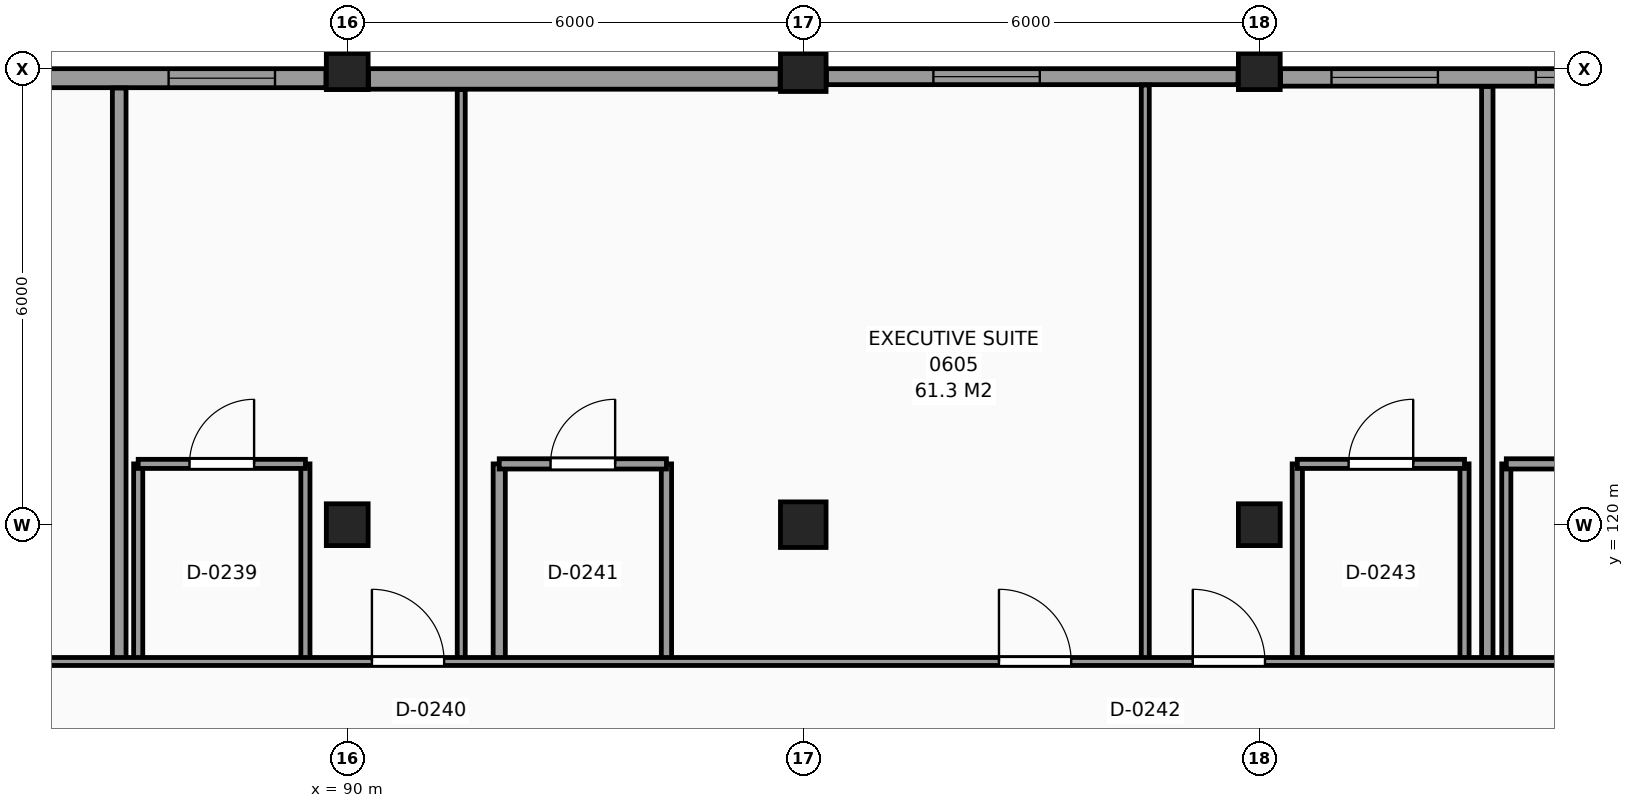
"""IFC4 building model, lengths in metres.
Left out: names, types, materials, properties, quantities, classifications, styles, units other than length and angle.
Written with IfcOpenShell. Run it as: python <this file> out.ifc"""

import sys

from ifc_helpers import new_model, si_unit, direction, frame, frame_2d, origin, origin_2d, place, context, subcontext, project, spatial, rectangle, extrude, element, fill, save


model = new_model("IFC4")
c1 = context("Model", 3, precision=1e-05, world=origin(), true_north=direction((0.0, 1.0)))
c2 = subcontext(c1, "Body", "Model", "MODEL_VIEW")
j1 = project(units=[si_unit("LENGTHUNIT", "METRE"), si_unit("PLANEANGLEUNIT", "RADIAN")], contexts=[c1])
p1 = place(None, origin())
s1 = spatial("IfcSite", under=j1, at=p1, CompositionType="ELEMENT")
p2 = place(p1, origin())
s2 = spatial("IfcBuilding", under=s1, at=p2, CompositionType="ELEMENT")
p3 = place(p2, frame((0.0, 0.0, 28.2)))
s3 = spatial("IfcBuildingStorey", under=s2, at=p3, CompositionType="ELEMENT", Elevation=28.2)
for number, where, z_axis, x_axis in (
    (1, (90.0, 120.0, 0.0), (0.0, 0.0, 1.0), (1.0, 0.0, 0.0)),
    (2, (90.0, 126.0, 0.0), (0.0, 0.0, 1.0), (1.0, 0.0, 0.0)),
):
    element("IfcColumn", number, at=place(p3, frame(where, z_axis=z_axis, x_axis=x_axis)), inside=s3, PredefinedType="COLUMN", context=c2, shape_type="SweptSolid", body=[
        extrude(rectangle(XDim=0.55, YDim=0.55, at=origin_2d()), origin(), (0.0, 0.0, 1.0), 3.3),
    ])
for number, where, z_axis, x_axis in (
    (3, (96.0, 120.0, 0.0), (0.0, 0.0, 1.0), (1.0, 0.0, 0.0)),
    (4, (96.0, 126.0, 0.0), (0.0, 0.0, 1.0), (1.0, 0.0, 0.0)),
):
    element("IfcColumn", number, at=place(p3, frame(where, z_axis=z_axis, x_axis=x_axis)), inside=s3, PredefinedType="COLUMN", context=c2, shape_type="SweptSolid", body=[
        extrude(rectangle(XDim=0.6, YDim=0.6, at=origin_2d()), origin(), (0.0, 0.0, 1.0), 3.3),
    ])
for number, where, z_axis, x_axis in (
    (5, (102.0, 120.0, 0.0), (0.0, 0.0, 1.0), (1.0, 0.0, 0.0)),
    (6, (102.0, 126.0, 0.0), (0.0, 0.0, 1.0), (1.0, 0.0, 0.0)),
):
    element("IfcColumn", number, at=place(p3, frame(where, z_axis=z_axis, x_axis=x_axis)), inside=s3, PredefinedType="COLUMN", context=c2, shape_type="SweptSolid", body=[
        extrude(rectangle(XDim=0.55, YDim=0.55, at=origin_2d()), origin(), (0.0, 0.0, 1.0), 3.3),
    ])
p4 = place(p3, frame((107.695, 125.885, 0.0), z_axis=(0.0, 0.0, 1.0), x_axis=(-1.0, 0.0, 0.0)))
e7 = element("IfcWall", 7, at=p4, inside=s3, PredefinedType="SOLIDWALL", context=c2, shape_type="SweptSolid", body=[
    extrude(rectangle(XDim=5.415, YDim=0.23, at=frame_2d((2.708, 0.0))), origin(), (0.0, 0.0, 1.0), 2.43),
])
p5 = place(p4, frame((3.345, 0.0, 0.8)))
e8 = element("IfcOpeningElement", 8, at=p5, cuts=e7, PredefinedType="OPENING", context=c2, shape_type="SweptSolid", body=[
    extrude(rectangle(XDim=1.4, YDim=1.4, at=frame_2d((0.7, 0.7))), frame((0.0, 0.125, 0.0), z_axis=(0.0, -1.0, 0.0), x_axis=(1.0, 0.0, 0.0)), (0.0, 0.0, 1.0), 0.25),
])
p6 = place(p4, frame((0.657, 0.0, 0.8)))
e9 = element("IfcOpeningElement", 9, at=p6, cuts=e7, PredefinedType="OPENING", context=c2, shape_type="SweptSolid", body=[
    extrude(rectangle(XDim=1.4, YDim=1.4, at=frame_2d((0.7, 0.7))), frame((0.0, 0.125, 0.0), z_axis=(0.0, -1.0, 0.0), x_axis=(1.0, 0.0, 0.0)), (0.0, 0.0, 1.0), 0.25),
])
p7 = place(p3, frame((101.72, 125.895, 0.0), z_axis=(0.0, 0.0, 1.0), x_axis=(-1.0, 0.0, 0.0)))
e10 = element("IfcWall", 10, at=p7, inside=s3, PredefinedType="SOLIDWALL", context=c2, shape_type="SweptSolid", body=[
    extrude(rectangle(XDim=5.415, YDim=0.21, at=frame_2d((2.708, 0.0))), origin(), (0.0, 0.0, 1.0), 2.43),
])
p8 = place(p7, frame((2.608, 0.0, 0.8)))
e11 = element("IfcOpeningElement", 11, at=p8, cuts=e10, PredefinedType="OPENING", context=c2, shape_type="SweptSolid", body=[
    extrude(rectangle(XDim=1.4, YDim=1.4, at=frame_2d((0.7, 0.7))), frame((0.0, 0.115, 0.0), z_axis=(0.0, -1.0, 0.0), x_axis=(1.0, 0.0, 0.0)), (0.0, 0.0, 1.0), 0.23),
])
p9 = place(p3, frame((95.695, 125.865, 0.0), z_axis=(0.0, 0.0, 1.0), x_axis=(-1.0, 0.0, 0.0)))
e12 = element("IfcWall", 12, at=p9, inside=s3, PredefinedType="SOLIDWALL", context=c2, shape_type="SweptSolid", body=[
    extrude(rectangle(XDim=5.415, YDim=0.27, at=frame_2d((2.708, 0.0))), origin(), (0.0, 0.0, 1.0), 2.43),
])
p10 = place(p3, frame((89.72, 125.875, 0.0), z_axis=(0.0, 0.0, 1.0), x_axis=(-1.0, 0.0, 0.0)))
e13 = element("IfcWall", 13, at=p10, inside=s3, PredefinedType="SOLIDWALL", context=c2, shape_type="SweptSolid", body=[
    extrude(rectangle(XDim=5.415, YDim=0.25, at=frame_2d((2.708, 0.0))), origin(), (0.0, 0.0, 1.0), 2.43),
])
p11 = place(p10, frame((0.67, 0.0, 0.8)))
e14 = element("IfcOpeningElement", 14, at=p11, cuts=e13, PredefinedType="OPENING", context=c2, shape_type="SweptSolid", body=[
    extrude(rectangle(XDim=1.4, YDim=1.4, at=frame_2d((0.7, 0.7))), frame((0.0, 0.135, 0.0), z_axis=(0.0, -1.0, 0.0), x_axis=(1.0, 0.0, 0.0)), (0.0, 0.0, 1.0), 0.27),
])
p12 = place(p3, frame((87.0, 118.2, 0.0), z_axis=(0.0, 0.0, 1.0), x_axis=(0.0, 1.0, 0.0)))
e15 = element("IfcWall", 15, at=p12, inside=s3, PredefinedType="PARTITIONING", context=c2, shape_type="SweptSolid", body=[
    extrude(rectangle(XDim=7.545, YDim=0.18, at=frame_2d((3.772, 0.0))), origin(), (0.0, 0.0, 1.0), 3.08),
])
for number, where, z_axis, x_axis in (
    (16, (87.25, 118.2, 0.0), (0.0, 0.0, 1.0), (0.0, 1.0, 0.0)),
    (17, (89.45, 118.2, 0.0), (0.0, 0.0, 1.0), (0.0, 1.0, 0.0)),
):
    element("IfcWall", number, at=place(p3, frame(where, z_axis=z_axis, x_axis=x_axis)), inside=s3, PredefinedType="PARTITIONING", context=c2, shape_type="SweptSolid", body=[
        extrude(rectangle(XDim=2.6, YDim=0.12, at=frame_2d((1.3, 0.0))), origin(), (0.0, 0.0, 1.0), 3.08),
    ])
p13 = place(p3, frame((91.5, 118.2, 0.0), z_axis=(0.0, 0.0, 1.0), x_axis=(0.0, 1.0, 0.0)))
e18 = element("IfcWall", 18, at=p13, inside=s3, PredefinedType="PARTITIONING", context=c2, shape_type="SweptSolid", body=[
    extrude(rectangle(XDim=7.525, YDim=0.105, at=frame_2d((3.763, 0.0))), origin(), (0.0, 0.0, 1.0), 3.08),
])
p14 = place(p3, frame((92.0, 118.2, 0.0), z_axis=(0.0, 0.0, 1.0), x_axis=(0.0, 1.0, 0.0)))
e19 = element("IfcWall", 19, at=p14, inside=s3, PredefinedType="PARTITIONING", context=c2, shape_type="SweptSolid", body=[
    extrude(rectangle(XDim=2.6, YDim=0.16, at=frame_2d((1.3, 0.0))), origin(), (0.0, 0.0, 1.0), 3.08),
])
p15 = place(p3, frame((94.2, 118.2, 0.0), z_axis=(0.0, 0.0, 1.0), x_axis=(0.0, 1.0, 0.0)))
e20 = element("IfcWall", 20, at=p15, inside=s3, PredefinedType="PARTITIONING", context=c2, shape_type="SweptSolid", body=[
    extrude(rectangle(XDim=2.6, YDim=0.135, at=frame_2d((1.3, 0.0))), origin(), (0.0, 0.0, 1.0), 3.08),
])
p16 = place(p3, frame((100.5, 118.2, 0.0), z_axis=(0.0, 0.0, 1.0), x_axis=(0.0, 1.0, 0.0)))
e21 = element("IfcWall", 21, at=p16, inside=s3, PredefinedType="PARTITIONING", context=c2, shape_type="SweptSolid", body=[
    extrude(rectangle(XDim=7.585, YDim=0.105, at=frame_2d((3.792, 0.0))), origin(), (0.0, 0.0, 1.0), 3.08),
])
p17 = place(p3, frame((102.5, 118.2, 0.0), z_axis=(0.0, 0.0, 1.0), x_axis=(0.0, 1.0, 0.0)))
e22 = element("IfcWall", 22, at=p17, inside=s3, PredefinedType="PARTITIONING", context=c2, shape_type="SweptSolid", body=[
    extrude(rectangle(XDim=2.6, YDim=0.135, at=frame_2d((1.3, 0.0))), origin(), (0.0, 0.0, 1.0), 3.08),
])
p18 = place(p3, frame((104.7, 118.2, 0.0), z_axis=(0.0, 0.0, 1.0), x_axis=(0.0, 1.0, 0.0)))
e23 = element("IfcWall", 23, at=p18, inside=s3, PredefinedType="PARTITIONING", context=c2, shape_type="SweptSolid", body=[
    extrude(rectangle(XDim=2.6, YDim=0.12, at=frame_2d((1.3, 0.0))), origin(), (0.0, 0.0, 1.0), 3.08),
])
p19 = place(p3, frame((105.0, 118.2, 0.0), z_axis=(0.0, 0.0, 1.0), x_axis=(0.0, 1.0, 0.0)))
e24 = element("IfcWall", 24, at=p19, inside=s3, PredefinedType="PARTITIONING", context=c2, shape_type="SweptSolid", body=[
    extrude(rectangle(XDim=7.565, YDim=0.15, at=frame_2d((3.782, 0.0))), origin(), (0.0, 0.0, 1.0), 3.08),
])
p20 = place(p3, frame((105.25, 118.2, 0.0), z_axis=(0.0, 0.0, 1.0), x_axis=(0.0, 1.0, 0.0)))
e25 = element("IfcWall", 25, at=p20, inside=s3, PredefinedType="PARTITIONING", context=c2, shape_type="SweptSolid", body=[
    extrude(rectangle(XDim=2.6, YDim=0.12, at=frame_2d((1.3, 0.0))), origin(), (0.0, 0.0, 1.0), 3.08),
])
p21 = place(p3, frame((66.235, 118.2, 0.0), z_axis=(0.0, 0.0, 1.0), x_axis=(1.0, 0.0, 0.0)))
e26 = element("IfcWall", 26, at=p21, inside=s3, PredefinedType="PARTITIONING", context=c2, shape_type="SweptSolid", body=[
    extrude(rectangle(XDim=110.265, YDim=0.105, at=frame_2d((55.132, 0.0))), origin(), (0.0, 0.0, 1.0), 3.08),
])
p22 = place(p21, frame((0.49, 0.0, 0.0)))
e27 = element("IfcOpeningElement", 27, at=p22, cuts=e26, PredefinedType="OPENING", context=c2, shape_type="SweptSolid", body=[
    extrude(rectangle(XDim=0.95, YDim=2.1, at=frame_2d((0.475, 1.05))), frame((0.0, 0.062, 0.0), z_axis=(0.0, -1.0, 0.0), x_axis=(1.0, 0.0, 0.0)), (0.0, 0.0, 1.0), 0.125),
])
p23 = place(p21, frame((4.89, 0.0, 0.0)))
e28 = element("IfcOpeningElement", 28, at=p23, cuts=e26, PredefinedType="OPENING", context=c2, shape_type="SweptSolid", body=[
    extrude(rectangle(XDim=0.95, YDim=2.1, at=frame_2d((0.475, 1.05))), frame((0.0, 0.062, 0.0), z_axis=(0.0, -1.0, 0.0), x_axis=(1.0, 0.0, 0.0)), (0.0, 0.0, 1.0), 0.125),
])
p24 = place(p21, frame((9.39, 0.0, 0.0)))
e29 = element("IfcOpeningElement", 29, at=p24, cuts=e26, PredefinedType="OPENING", context=c2, shape_type="SweptSolid", body=[
    extrude(rectangle(XDim=0.95, YDim=2.1, at=frame_2d((0.475, 1.05))), frame((0.0, 0.062, 0.0), z_axis=(0.0, -1.0, 0.0), x_axis=(1.0, 0.0, 0.0)), (0.0, 0.0, 1.0), 0.125),
])
p25 = place(p21, frame((24.09, 0.0, 0.0)))
e30 = element("IfcOpeningElement", 30, at=p25, cuts=e26, PredefinedType="OPENING", context=c2, shape_type="SweptSolid", body=[
    extrude(rectangle(XDim=0.95, YDim=2.1, at=frame_2d((0.475, 1.05))), frame((0.0, 0.062, 0.0), z_axis=(0.0, -1.0, 0.0), x_axis=(1.0, 0.0, 0.0)), (0.0, 0.0, 1.0), 0.125),
])
p26 = place(p21, frame((32.34, 0.0, 0.0)))
e31 = element("IfcOpeningElement", 31, at=p26, cuts=e26, PredefinedType="OPENING", context=c2, shape_type="SweptSolid", body=[
    extrude(rectangle(XDim=0.95, YDim=2.1, at=frame_2d((0.475, 1.05))), frame((0.0, 0.062, 0.0), z_axis=(0.0, -1.0, 0.0), x_axis=(1.0, 0.0, 0.0)), (0.0, 0.0, 1.0), 0.125),
])
p27 = place(p21, frame((34.89, 0.0, 0.0)))
e32 = element("IfcOpeningElement", 32, at=p27, cuts=e26, PredefinedType="OPENING", context=c2, shape_type="SweptSolid", body=[
    extrude(rectangle(XDim=0.95, YDim=2.1, at=frame_2d((0.475, 1.05))), frame((0.0, 0.062, 0.0), z_axis=(0.0, -1.0, 0.0), x_axis=(1.0, 0.0, 0.0)), (0.0, 0.0, 1.0), 0.125),
])
p28 = place(p21, frame((42.09, 0.0, 0.0)))
e33 = element("IfcOpeningElement", 33, at=p28, cuts=e26, PredefinedType="OPENING", context=c2, shape_type="SweptSolid", body=[
    extrude(rectangle(XDim=0.95, YDim=2.1, at=frame_2d((0.475, 1.05))), frame((0.0, 0.062, 0.0), z_axis=(0.0, -1.0, 0.0), x_axis=(1.0, 0.0, 0.0)), (0.0, 0.0, 1.0), 0.125),
])
p29 = place(p21, frame((46.29, 0.0, 0.0)))
e34 = element("IfcOpeningElement", 34, at=p29, cuts=e26, PredefinedType="OPENING", context=c2, shape_type="SweptSolid", body=[
    extrude(rectangle(XDim=0.95, YDim=2.1, at=frame_2d((0.475, 1.05))), frame((0.0, 0.062, 0.0), z_axis=(0.0, -1.0, 0.0), x_axis=(1.0, 0.0, 0.0)), (0.0, 0.0, 1.0), 0.125),
])
p30 = place(p21, frame((48.49, 0.0, 0.0)))
e35 = element("IfcOpeningElement", 35, at=p30, cuts=e26, PredefinedType="OPENING", context=c2, shape_type="SweptSolid", body=[
    extrude(rectangle(XDim=0.95, YDim=2.1, at=frame_2d((0.475, 1.05))), frame((0.0, 0.062, 0.0), z_axis=(0.0, -1.0, 0.0), x_axis=(1.0, 0.0, 0.0)), (0.0, 0.0, 1.0), 0.125),
])
p31 = place(p21, frame((54.49, 0.0, 0.0)))
e36 = element("IfcOpeningElement", 36, at=p31, cuts=e26, PredefinedType="OPENING", context=c2, shape_type="SweptSolid", body=[
    extrude(rectangle(XDim=0.95, YDim=2.1, at=frame_2d((0.475, 1.05))), frame((0.0, 0.062, 0.0), z_axis=(0.0, -1.0, 0.0), x_axis=(1.0, 0.0, 0.0)), (0.0, 0.0, 1.0), 0.125),
])
p32 = place(p21, frame((64.29, 0.0, 0.0)))
e37 = element("IfcOpeningElement", 37, at=p32, cuts=e26, PredefinedType="OPENING", context=c2, shape_type="SweptSolid", body=[
    extrude(rectangle(XDim=0.95, YDim=2.1, at=frame_2d((0.475, 1.05))), frame((0.0, 0.062, 0.0), z_axis=(0.0, -1.0, 0.0), x_axis=(1.0, 0.0, 0.0)), (0.0, 0.0, 1.0), 0.125),
])
p33 = place(p21, frame((66.49, 0.0, 0.0)))
e38 = element("IfcOpeningElement", 38, at=p33, cuts=e26, PredefinedType="OPENING", context=c2, shape_type="SweptSolid", body=[
    extrude(rectangle(XDim=0.95, YDim=2.1, at=frame_2d((0.475, 1.05))), frame((0.0, 0.062, 0.0), z_axis=(0.0, -1.0, 0.0), x_axis=(1.0, 0.0, 0.0)), (0.0, 0.0, 1.0), 0.125),
])
p34 = place(p21, frame((70.89, 0.0, 0.0)))
e39 = element("IfcOpeningElement", 39, at=p34, cuts=e26, PredefinedType="OPENING", context=c2, shape_type="SweptSolid", body=[
    extrude(rectangle(XDim=0.95, YDim=2.1, at=frame_2d((0.475, 1.05))), frame((0.0, 0.062, 0.0), z_axis=(0.0, -1.0, 0.0), x_axis=(1.0, 0.0, 0.0)), (0.0, 0.0, 1.0), 0.125),
])
p35 = place(p21, frame((78.09, 0.0, 0.0)))
e40 = element("IfcOpeningElement", 40, at=p35, cuts=e26, PredefinedType="OPENING", context=c2, shape_type="SweptSolid", body=[
    extrude(rectangle(XDim=0.95, YDim=2.1, at=frame_2d((0.475, 1.05))), frame((0.0, 0.062, 0.0), z_axis=(0.0, -1.0, 0.0), x_axis=(1.0, 0.0, 0.0)), (0.0, 0.0, 1.0), 0.125),
])
p36 = place(p21, frame((86.34, 0.0, 0.0)))
e41 = element("IfcOpeningElement", 41, at=p36, cuts=e26, PredefinedType="OPENING", context=c2, shape_type="SweptSolid", body=[
    extrude(rectangle(XDim=0.95, YDim=2.1, at=frame_2d((0.475, 1.05))), frame((0.0, 0.062, 0.0), z_axis=(0.0, -1.0, 0.0), x_axis=(1.0, 0.0, 0.0)), (0.0, 0.0, 1.0), 0.125),
])
p37 = place(p21, frame((88.89, 0.0, 0.0)))
e42 = element("IfcOpeningElement", 42, at=p37, cuts=e26, PredefinedType="OPENING", context=c2, shape_type="SweptSolid", body=[
    extrude(rectangle(XDim=0.95, YDim=2.1, at=frame_2d((0.475, 1.05))), frame((0.0, 0.062, 0.0), z_axis=(0.0, -1.0, 0.0), x_axis=(1.0, 0.0, 0.0)), (0.0, 0.0, 1.0), 0.125),
])
p38 = place(p21, frame((93.39, 0.0, 0.0)))
e43 = element("IfcOpeningElement", 43, at=p38, cuts=e26, PredefinedType="OPENING", context=c2, shape_type="SweptSolid", body=[
    extrude(rectangle(XDim=0.95, YDim=2.1, at=frame_2d((0.475, 1.05))), frame((0.0, 0.062, 0.0), z_axis=(0.0, -1.0, 0.0), x_axis=(1.0, 0.0, 0.0)), (0.0, 0.0, 1.0), 0.125),
])
p39 = place(p21, frame((104.99, 0.0, 0.0)))
e44 = element("IfcOpeningElement", 44, at=p39, cuts=e26, PredefinedType="OPENING", context=c2, shape_type="SweptSolid", body=[
    extrude(rectangle(XDim=0.95, YDim=2.1, at=frame_2d((0.475, 1.05))), frame((0.0, 0.062, 0.0), z_axis=(0.0, -1.0, 0.0), x_axis=(1.0, 0.0, 0.0)), (0.0, 0.0, 1.0), 0.125),
])
p40 = place(p3, frame((87.25, 120.8, 0.0), z_axis=(0.0, 0.0, 1.0), x_axis=(1.0, 0.0, 0.0)))
e45 = element("IfcWall", 45, at=p40, inside=s3, PredefinedType="PARTITIONING", context=c2, shape_type="SweptSolid", body=[
    extrude(rectangle(XDim=2.2, YDim=0.12, at=frame_2d((1.1, 0.0))), origin(), (0.0, 0.0, 1.0), 3.08),
])
p41 = place(p40, frame((0.675, 0.0, 0.0)))
e46 = element("IfcOpeningElement", 46, at=p41, cuts=e45, PredefinedType="OPENING", context=c2, shape_type="SweptSolid", body=[
    extrude(rectangle(XDim=0.85, YDim=2.1, at=frame_2d((0.425, 1.05))), frame((0.0, 0.07, 0.0), z_axis=(0.0, -1.0, 0.0), x_axis=(1.0, 0.0, 0.0)), (0.0, 0.0, 1.0), 0.14),
])
p42 = place(p3, frame((92.0, 120.8, 0.0), z_axis=(0.0, 0.0, 1.0), x_axis=(1.0, 0.0, 0.0)))
e47 = element("IfcWall", 47, at=p42, inside=s3, PredefinedType="PARTITIONING", context=c2, shape_type="SweptSolid", body=[
    extrude(rectangle(XDim=2.2, YDim=0.135, at=frame_2d((1.1, 0.0))), origin(), (0.0, 0.0, 1.0), 3.08),
])
p43 = place(p42, frame((0.675, 0.0, 0.0)))
e48 = element("IfcOpeningElement", 48, at=p43, cuts=e47, PredefinedType="OPENING", context=c2, shape_type="SweptSolid", body=[
    extrude(rectangle(XDim=0.85, YDim=2.1, at=frame_2d((0.425, 1.05))), frame((0.0, 0.078, 0.0), z_axis=(0.0, -1.0, 0.0), x_axis=(1.0, 0.0, 0.0)), (0.0, 0.0, 1.0), 0.155),
])
p44 = place(p3, frame((102.5, 120.8, 0.0), z_axis=(0.0, 0.0, 1.0), x_axis=(1.0, 0.0, 0.0)))
e49 = element("IfcWall", 49, at=p44, inside=s3, PredefinedType="PARTITIONING", context=c2, shape_type="SweptSolid", body=[
    extrude(rectangle(XDim=2.2, YDim=0.12, at=frame_2d((1.1, 0.0))), origin(), (0.0, 0.0, 1.0), 3.08),
])
p45 = place(p44, frame((0.675, 0.0, 0.0)))
e50 = element("IfcOpeningElement", 50, at=p45, cuts=e49, PredefinedType="OPENING", context=c2, shape_type="SweptSolid", body=[
    extrude(rectangle(XDim=0.85, YDim=2.1, at=frame_2d((0.425, 1.05))), frame((0.0, 0.07, 0.0), z_axis=(0.0, -1.0, 0.0), x_axis=(1.0, 0.0, 0.0)), (0.0, 0.0, 1.0), 0.14),
])
p46 = place(p3, frame((105.25, 120.8, 0.0), z_axis=(0.0, 0.0, 1.0), x_axis=(1.0, 0.0, 0.0)))
e51 = element("IfcWall", 51, at=p46, inside=s3, PredefinedType="PARTITIONING", context=c2, shape_type="SweptSolid", body=[
    extrude(rectangle(XDim=2.2, YDim=0.135, at=frame_2d((1.1, 0.0))), origin(), (0.0, 0.0, 1.0), 3.08),
])
p47 = place(p46, frame((0.675, 0.0, 0.0)))
e52 = element("IfcOpeningElement", 52, at=p47, cuts=e51, PredefinedType="OPENING", context=c2, shape_type="SweptSolid", body=[
    extrude(rectangle(XDim=0.85, YDim=2.1, at=frame_2d((0.425, 1.05))), frame((0.0, 0.078, 0.0), z_axis=(0.0, -1.0, 0.0), x_axis=(1.0, 0.0, 0.0)), (0.0, 0.0, 1.0), 0.155),
])
p48 = place(p11, origin())
e53 = element("IfcWindow", 53, at=p48, inside=s3, PartitioningType="SINGLE_PANEL", PredefinedType="WINDOW", context=c2, shape_type="SweptSolid", body=[
    extrude(rectangle(XDim=1.4, YDim=1.4, at=frame_2d((0.7, 0.7))), frame((0.0, 0.03, 0.0), z_axis=(0.0, -1.0, 0.0), x_axis=(1.0, 0.0, 0.0)), (0.0, 0.0, 1.0), 0.06),
])
fill(e14, e53)
p49 = place(p8, origin())
e54 = element("IfcWindow", 54, at=p49, inside=s3, PartitioningType="SINGLE_PANEL", PredefinedType="WINDOW", context=c2, shape_type="SweptSolid", body=[
    extrude(rectangle(XDim=1.4, YDim=1.4, at=frame_2d((0.7, 0.7))), frame((0.0, 0.03, 0.0), z_axis=(0.0, -1.0, 0.0), x_axis=(1.0, 0.0, 0.0)), (0.0, 0.0, 1.0), 0.06),
])
fill(e11, e54)
p50 = place(p5, origin())
e55 = element("IfcWindow", 55, at=p50, inside=s3, PartitioningType="SINGLE_PANEL", PredefinedType="WINDOW", context=c2, shape_type="SweptSolid", body=[
    extrude(rectangle(XDim=1.4, YDim=1.4, at=frame_2d((0.7, 0.7))), frame((0.0, 0.03, 0.0), z_axis=(0.0, -1.0, 0.0), x_axis=(1.0, 0.0, 0.0)), (0.0, 0.0, 1.0), 0.06),
])
fill(e8, e55)
p51 = place(p6, origin())
e56 = element("IfcWindow", 56, at=p51, inside=s3, PartitioningType="SINGLE_PANEL", PredefinedType="WINDOW", context=c2, shape_type="SweptSolid", body=[
    extrude(rectangle(XDim=1.4, YDim=1.4, at=frame_2d((0.7, 0.7))), frame((0.0, 0.03, 0.0), z_axis=(0.0, -1.0, 0.0), x_axis=(1.0, 0.0, 0.0)), (0.0, 0.0, 1.0), 0.06),
])
fill(e9, e56)
p52 = place(p41, origin())
e57 = element("IfcDoor", 57, at=p52, inside=s3, OperationType="SINGLE_SWING_RIGHT", PredefinedType="DOOR", context=c2, shape_type="SweptSolid", body=[
    extrude(rectangle(XDim=0.85, YDim=2.1, at=frame_2d((0.425, 1.05))), frame((0.0, 0.025, 0.0), z_axis=(0.0, -1.0, 0.0), x_axis=(1.0, 0.0, 0.0)), (0.0, 0.0, 1.0), 0.05),
])
fill(e46, e57)
p53 = place(p25, origin())
e58 = element("IfcDoor", 58, at=p53, inside=s3, OperationType="SINGLE_SWING_LEFT", PredefinedType="DOOR", context=c2, shape_type="SweptSolid", body=[
    extrude(rectangle(XDim=0.95, YDim=2.1, at=frame_2d((0.475, 1.05))), frame((0.0, 0.025, 0.0), z_axis=(0.0, -1.0, 0.0), x_axis=(1.0, 0.0, 0.0)), (0.0, 0.0, 1.0), 0.05),
])
fill(e30, e58)
p54 = place(p43, origin())
e59 = element("IfcDoor", 59, at=p54, inside=s3, OperationType="SINGLE_SWING_RIGHT", PredefinedType="DOOR", context=c2, shape_type="SweptSolid", body=[
    extrude(rectangle(XDim=0.85, YDim=2.1, at=frame_2d((0.425, 1.05))), frame((0.0, 0.025, 0.0), z_axis=(0.0, -1.0, 0.0), x_axis=(1.0, 0.0, 0.0)), (0.0, 0.0, 1.0), 0.05),
])
fill(e48, e59)
p55 = place(p26, origin())
e60 = element("IfcDoor", 60, at=p55, inside=s3, OperationType="SINGLE_SWING_LEFT", PredefinedType="DOOR", context=c2, shape_type="SweptSolid", body=[
    extrude(rectangle(XDim=0.95, YDim=2.1, at=frame_2d((0.475, 1.05))), frame((0.0, 0.025, 0.0), z_axis=(0.0, -1.0, 0.0), x_axis=(1.0, 0.0, 0.0)), (0.0, 0.0, 1.0), 0.05),
])
fill(e31, e60)
p56 = place(p45, origin())
e61 = element("IfcDoor", 61, at=p56, inside=s3, OperationType="SINGLE_SWING_RIGHT", PredefinedType="DOOR", context=c2, shape_type="SweptSolid", body=[
    extrude(rectangle(XDim=0.85, YDim=2.1, at=frame_2d((0.425, 1.05))), frame((0.0, 0.025, 0.0), z_axis=(0.0, -1.0, 0.0), x_axis=(1.0, 0.0, 0.0)), (0.0, 0.0, 1.0), 0.05),
])
fill(e50, e61)
p57 = place(p27, origin())
e62 = element("IfcDoor", 62, at=p57, inside=s3, OperationType="SINGLE_SWING_LEFT", PredefinedType="DOOR", context=c2, shape_type="SweptSolid", body=[
    extrude(rectangle(XDim=0.95, YDim=2.1, at=frame_2d((0.475, 1.05))), frame((0.0, 0.025, 0.0), z_axis=(0.0, -1.0, 0.0), x_axis=(1.0, 0.0, 0.0)), (0.0, 0.0, 1.0), 0.05),
])
fill(e32, e62)
save(model, sys.argv[1])
